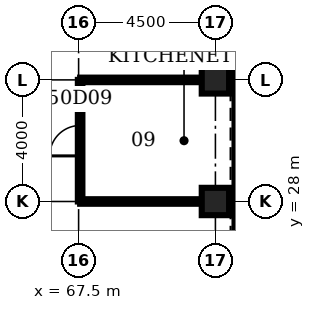
"""IFC4 building model, lengths in metres.
Left out: names, types, materials, properties, quantities, classifications, styles, units other than length and angle.
Written with IfcOpenShell. Run it as: python <this file> out.ifc"""

import sys

from ifc_helpers import new_model, si_unit, direction, frame, frame_2d, origin, origin_2d, place, context, subcontext, project, spatial, rectangle, hollow_rectangle, extrude, element, fill, save


model = new_model("IFC4")
c1 = context("Model", 3, precision=1e-05, world=origin(), true_north=direction((0.0, 1.0)))
c2 = subcontext(c1, "Body", "Model", "MODEL_VIEW")
j1 = project(units=[si_unit("LENGTHUNIT", "METRE"), si_unit("PLANEANGLEUNIT", "RADIAN")], contexts=[c1])
p1 = place(None, origin())
s1 = spatial("IfcSite", under=j1, at=p1, CompositionType="ELEMENT")
p2 = place(p1, origin())
s2 = spatial("IfcBuilding", under=s1, at=p2, CompositionType="ELEMENT")
p3 = place(p2, frame((0.0, 0.0, 223.6)))
s3 = spatial("IfcBuildingStorey", under=s2, at=p3, CompositionType="ELEMENT", Elevation=223.6)
for number, where, z_axis, x_axis in (
    (1, (72.0, 28.0, 0.0), (0.0, 0.0, 1.0), (1.0, 0.0, 0.0)),
    (2, (72.0, 32.0, 0.0), (0.0, 0.0, 1.0), (1.0, 0.0, 0.0)),
):
    element("IfcColumn", number, at=place(p3, frame(where, z_axis=z_axis, x_axis=x_axis)), inside=s3, PredefinedType="COLUMN", context=c2, shape_type="SweptSolid", body=[
        extrude(hollow_rectangle(XDim=0.9, YDim=0.9, WallThickness=0.08, at=origin_2d()), origin(), (0.0, 0.0, 1.0), 4.2),
    ])
for number, where, z_axis, x_axis in (
    (3, (67.55, 28.0, 0.0), (0.0, 0.0, 1.0), (1.0, 0.0, 0.0)),
    (4, (67.55, 32.0, 0.0), (0.0, 0.0, 1.0), (1.0, 0.0, 0.0)),
):
    element("IfcWall", number, at=place(p3, frame(where, z_axis=z_axis, x_axis=x_axis)), inside=s3, PredefinedType="PARTITIONING", context=c2, shape_type="SweptSolid", body=[
        extrude(rectangle(XDim=4.0, YDim=0.15, at=frame_2d((2.0, 0.0))), origin(), (0.0, 0.0, 1.0), 3.0),
    ])
p4 = place(p3, frame((67.55, 28.0, 0.0), z_axis=(0.0, 0.0, 1.0), x_axis=(0.0, 1.0, 0.0)))
e5 = element("IfcWall", 5, at=p4, inside=s3, PredefinedType="PARTITIONING", context=c2, shape_type="SweptSolid", body=[
    extrude(rectangle(XDim=4.0, YDim=0.15, at=frame_2d((2.0, 0.0))), origin(), (0.0, 0.0, 1.0), 3.0),
])
p5 = place(p4, frame((1.5, 0.0, 0.0)))
e6 = element("IfcOpeningElement", 6, at=p5, cuts=e5, PredefinedType="OPENING", context=c2, shape_type="SweptSolid", body=[
    extrude(rectangle(XDim=1.0, YDim=2.1, at=frame_2d((0.5, 1.05))), frame((0.0, 0.085, 0.0), z_axis=(0.0, -1.0, 0.0), x_axis=(1.0, 0.0, 0.0)), (0.0, 0.0, 1.0), 0.17),
])
p6 = place(p5, origin())
e7 = element("IfcDoor", 7, at=p6, inside=s3, OperationType="SINGLE_SWING_LEFT", PredefinedType="DOOR", context=c2, shape_type="SweptSolid", body=[
    extrude(rectangle(XDim=1.0, YDim=2.1, at=frame_2d((0.5, 1.05))), frame((0.0, 0.025, 0.0), z_axis=(0.0, -1.0, 0.0), x_axis=(1.0, 0.0, 0.0)), (0.0, 0.0, 1.0), 0.05),
])
fill(e6, e7)
save(model, sys.argv[1])
